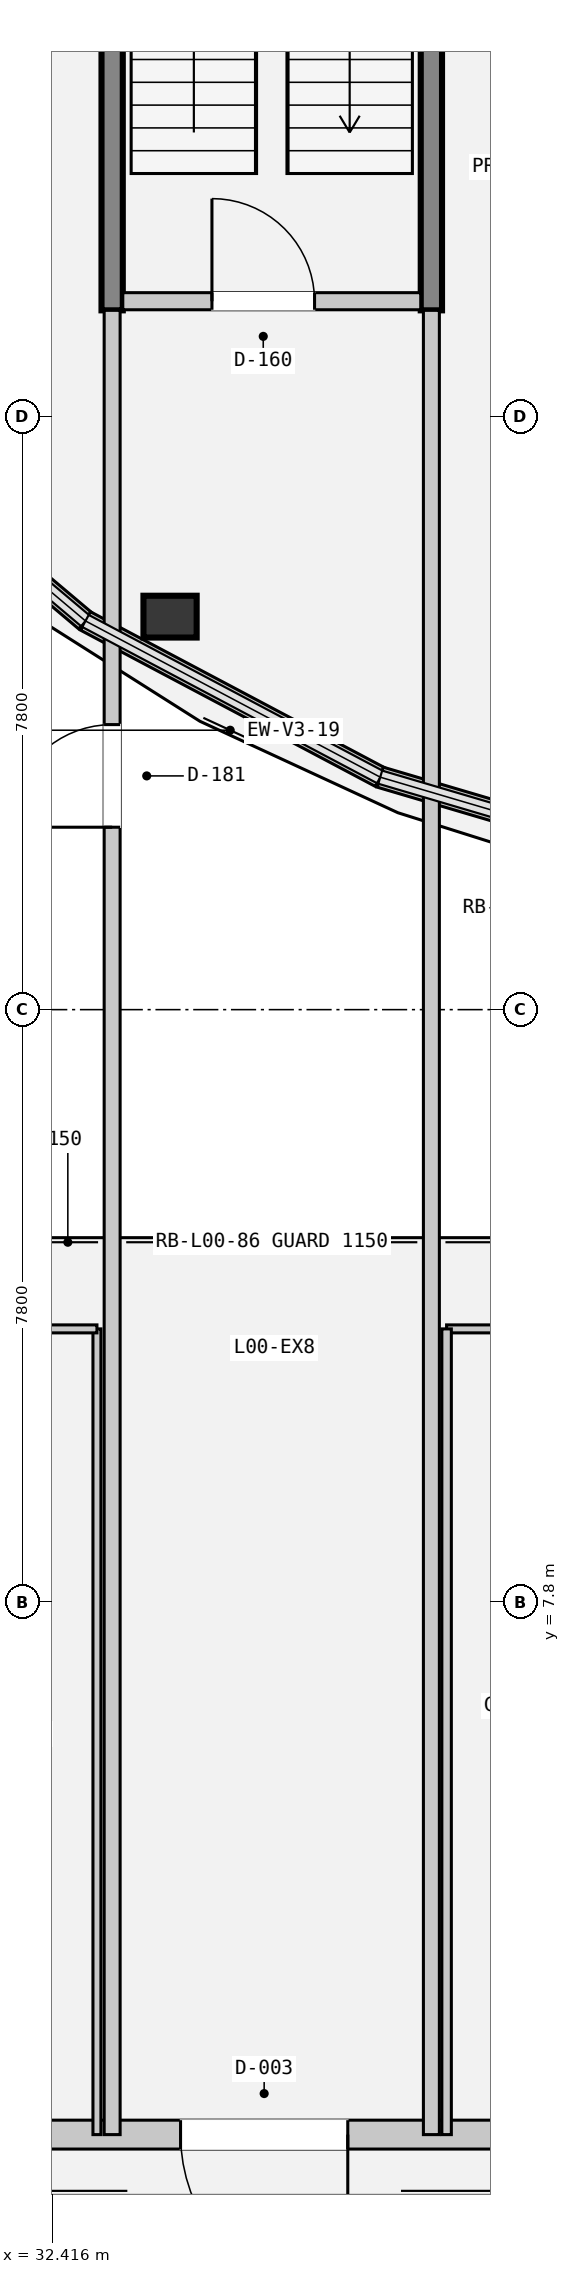
"""IFC4 building model, lengths in metres.
Left out: names, types, materials, properties, quantities, classifications, styles, units other than length and angle.
Written with IfcOpenShell. Run it as: python <this file> out.ifc"""

import sys

from ifc_helpers import new_model, si_unit, direction, frame, frame_2d, origin, origin_2d, place, context, subcontext, project, spatial, rectangle, extrude, element, fill, save


model = new_model("IFC4")
c1 = context("Model", 3, precision=1e-05, world=origin(), true_north=direction((0.0, 1.0)))
c2 = subcontext(c1, "Body", "Model", "MODEL_VIEW")
j1 = project(units=[si_unit("LENGTHUNIT", "METRE"), si_unit("PLANEANGLEUNIT", "RADIAN")], contexts=[c1])
p1 = place(None, origin())
s1 = spatial("IfcSite", under=j1, at=p1, CompositionType="ELEMENT")
p2 = place(p1, origin())
s2 = spatial("IfcBuilding", under=s1, at=p2, CompositionType="ELEMENT")
p3 = place(p2, origin())
s3 = spatial("IfcBuildingStorey", under=s2, at=p3, CompositionType="ELEMENT", Elevation=0.0)
p4 = place(p3, frame((33.962, 20.77, 0.0), z_axis=(0.0, 0.0, 1.0), x_axis=(1.0, 0.0, 0.0)))
e1 = element("IfcColumn", 1, at=p4, inside=s3, PredefinedType="COLUMN", context=c2, shape_type="SweptSolid", body=[
    extrude(rectangle(XDim=0.7, YDim=0.55, at=origin_2d()), origin(), (0.0, 0.0, 1.0), 5.4),
])
for number, where, z_axis, x_axis in (
    (2, (33.2, 24.8, 0.0), (0.0, 0.0, 1.0), (0.0, 1.0, 0.0)),
    (3, (37.4, 24.8, 0.0), (0.0, 0.0, 1.0), (0.0, 1.0, 0.0)),
):
    element("IfcWall", number, at=place(p3, frame(where, z_axis=z_axis, x_axis=x_axis)), inside=s3, PredefinedType="SHEAR", context=c2, shape_type="SweptSolid", body=[
        extrude(rectangle(XDim=8.4, YDim=0.28, at=frame_2d((4.2, 0.0))), origin(), (0.0, 0.0, 1.0), 5.4),
    ])
p5 = place(p3, frame((29.612, 23.445, 0.0), z_axis=(0.0, 0.0, 1.0), x_axis=(0.764366928563, -0.644781512234, 0.0)))
e4 = element("IfcWall", 4, at=p5, inside=s3, PredefinedType="SOLIDWALL", context=c2, shape_type="SweptSolid", body=[
    extrude(rectangle(XDim=4.236, YDim=0.275, at=frame_2d((2.118, 0.0))), origin(), (0.0, 0.0, 1.0), 1.02),
])
p6 = place(p3, frame((32.85, 20.713, 0.0), z_axis=(0.0, 0.0, 1.0), x_axis=(0.883560469247, -0.468317090425, 0.0)))
e5 = element("IfcWall", 5, at=p6, inside=s3, PredefinedType="SOLIDWALL", context=c2, shape_type="SweptSolid", body=[
    extrude(rectangle(XDim=4.388, YDim=0.275, at=frame_2d((2.194, 0.0))), origin(), (0.0, 0.0, 1.0), 1.02),
])
p7 = place(p3, frame((36.727, 18.658, 0.0), z_axis=(0.0, 0.0, 1.0), x_axis=(0.959101976786, -0.28306076755, 0.0)))
e6 = element("IfcWall", 6, at=p7, inside=s3, PredefinedType="SOLIDWALL", context=c2, shape_type="SweptSolid", body=[
    extrude(rectangle(XDim=4.507, YDim=0.275, at=frame_2d((2.253, 0.0))), origin(), (0.0, 0.0, 1.0), 1.02),
])
p8 = place(p3, frame((46.2, 0.8, 0.0), z_axis=(0.0, 0.0, 1.0), x_axis=(-1.0, 0.0, 0.0)))
e7 = element("IfcWall", 7, at=p8, inside=s3, PredefinedType="SOLIDWALL", context=c2, shape_type="SweptSolid", body=[
    extrude(rectangle(XDim=21.2, YDim=0.38, at=frame_2d((10.6, 0.0))), origin(), (0.0, 0.0, 1.0), 4.46),
])
p9 = place(p8, frame((9.9, 0.0, 0.0)))
e8 = element("IfcOpeningElement", 8, at=p9, cuts=e7, PredefinedType="OPENING", context=c2, shape_type="SweptSolid", body=[
    extrude(rectangle(XDim=2.2, YDim=2.6, at=frame_2d((1.1, 1.3))), frame((0.0, 0.2, 0.0), z_axis=(0.0, -1.0, 0.0), x_axis=(1.0, 0.0, 0.0)), (0.0, 0.0, 1.0), 0.4),
])
p10 = place(p8, frame((3.4, 0.0, 0.0)))
e9 = element("IfcOpeningElement", 9, at=p10, cuts=e7, PredefinedType="OPENING", context=c2, shape_type="SweptSolid", body=[
    extrude(rectangle(XDim=2.2, YDim=2.6, at=frame_2d((1.1, 1.3))), frame((0.0, 0.2, 0.0), z_axis=(0.0, -1.0, 0.0), x_axis=(1.0, 0.0, 0.0)), (0.0, 0.0, 1.0), 0.4),
])
p11 = place(p3, frame((33.34, 24.92, 0.0), z_axis=(0.0, 0.0, 1.0), x_axis=(1.0, 0.0, 0.0)))
e10 = element("IfcWall", 10, at=p11, inside=s3, PredefinedType="PARTITIONING", context=c2, shape_type="SweptSolid", body=[
    extrude(rectangle(XDim=3.92, YDim=0.225, at=frame_2d((1.96, 0.0))), origin(), (0.0, 0.0, 1.0), 4.11),
])
p12 = place(p11, frame((1.173, 0.0, 0.0)))
e11 = element("IfcOpeningElement", 11, at=p12, cuts=e10, PredefinedType="OPENING", context=c2, shape_type="SweptSolid", body=[
    extrude(rectangle(XDim=1.35, YDim=2.2, at=frame_2d((0.675, 1.1))), frame((0.0, 0.123, 0.0), z_axis=(0.0, -1.0, 0.0), x_axis=(1.0, 0.0, 0.0)), (0.0, 0.0, 1.0), 0.245),
])
p13 = place(p3, frame((33.0, 0.8, 0.0), z_axis=(0.0, 0.0, 1.0), x_axis=(0.0, 1.0, 0.0)))
e12 = element("IfcWall", 12, at=p13, inside=s3, PredefinedType="PARTITIONING", context=c2, shape_type="SweptSolid", body=[
    extrude(rectangle(XDim=10.6, YDim=0.105, at=frame_2d((5.3, 0.0))), origin(), (0.0, 0.0, 1.0), 3.45),
])
p14 = place(p3, frame((33.0, 11.4, 0.0), z_axis=(0.0, 0.0, 1.0), x_axis=(-1.0, 0.0, 0.0)))
e13 = element("IfcWall", 13, at=p14, inside=s3, PredefinedType="PARTITIONING", context=c2, shape_type="SweptSolid", body=[
    extrude(rectangle(XDim=7.8, YDim=0.105, at=frame_2d((3.9, 0.0))), origin(), (0.0, 0.0, 1.0), 3.45),
])
p15 = place(p14, frame((1.106, 0.0, 0.0)))
e14 = element("IfcOpeningElement", 14, at=p15, cuts=e13, PredefinedType="OPENING", context=c2, shape_type="SweptSolid", body=[
    extrude(rectangle(XDim=1.75, YDim=2.4, at=frame_2d((0.875, 1.2))), frame((0.0, 0.062, 0.0), z_axis=(0.0, -1.0, 0.0), x_axis=(1.0, 0.0, 0.0)), (0.0, 0.0, 1.0), 0.125),
])
p16 = place(p3, frame((46.0, 11.4, 0.0), z_axis=(0.0, 0.0, 1.0), x_axis=(-1.0, 0.0, 0.0)))
e15 = element("IfcWall", 15, at=p16, inside=s3, PredefinedType="PARTITIONING", context=c2, shape_type="SweptSolid", body=[
    extrude(rectangle(XDim=8.4, YDim=0.105, at=frame_2d((4.2, 0.0))), origin(), (0.0, 0.0, 1.0), 3.45),
])
p17 = place(p16, frame((0.911, 0.0, 0.0)))
e16 = element("IfcOpeningElement", 16, at=p17, cuts=e15, PredefinedType="OPENING", context=c2, shape_type="SweptSolid", body=[
    extrude(rectangle(XDim=1.85, YDim=2.4, at=frame_2d((0.925, 1.2))), frame((0.0, 0.062, 0.0), z_axis=(0.0, -1.0, 0.0), x_axis=(1.0, 0.0, 0.0)), (0.0, 0.0, 1.0), 0.125),
])
p18 = place(p3, frame((37.6, 11.4, 0.0), z_axis=(0.0, 0.0, 1.0), x_axis=(0.0, -1.0, 0.0)))
e17 = element("IfcWall", 17, at=p18, inside=s3, PredefinedType="PARTITIONING", context=c2, shape_type="SweptSolid", body=[
    extrude(rectangle(XDim=10.6, YDim=0.125, at=frame_2d((5.3, 0.0))), origin(), (0.0, 0.0, 1.0), 3.45),
])
p19 = place(p3, frame((37.4, 0.8, 0.0), z_axis=(0.0, 0.0, 1.0), x_axis=(0.0, 1.0, 0.0)))
e18 = element("IfcWall", 18, at=p19, inside=s3, PredefinedType="PARTITIONING", context=c2, shape_type="SweptSolid", body=[
    extrude(rectangle(XDim=24.0, YDim=0.21, at=frame_2d((12.0, 0.0))), origin(), (0.0, 0.0, 1.0), 3.45),
])
p20 = place(p3, frame((33.2, 0.8, 0.0), z_axis=(0.0, 0.0, 1.0), x_axis=(0.0, 1.0, 0.0)))
e19 = element("IfcWall", 19, at=p20, inside=s3, PredefinedType="PARTITIONING", context=c2, shape_type="SweptSolid", body=[
    extrude(rectangle(XDim=24.0, YDim=0.21, at=frame_2d((12.0, 0.0))), origin(), (0.0, 0.0, 1.0), 3.45),
])
p21 = place(p20, frame((17.2, 0.0, 0.0)))
e20 = element("IfcOpeningElement", 20, at=p21, cuts=e19, PredefinedType="OPENING", context=c2, shape_type="SweptSolid", body=[
    extrude(rectangle(XDim=1.35, YDim=2.2, at=frame_2d((0.675, 1.1))), frame((0.0, 0.115, 0.0), z_axis=(0.0, -1.0, 0.0), x_axis=(1.0, 0.0, 0.0)), (0.0, 0.0, 1.0), 0.23),
])
p22 = place(p9, origin())
e21 = element("IfcDoor", 21, at=p22, inside=s3, OperationType="DOUBLE_DOOR_SINGLE_SWING", PredefinedType="DOOR", context=c2, shape_type="SweptSolid", body=[
    extrude(rectangle(XDim=2.2, YDim=2.6, at=frame_2d((1.1, 1.3))), frame((0.0, 0.025, 0.0), z_axis=(0.0, -1.0, 0.0), x_axis=(1.0, 0.0, 0.0)), (0.0, 0.0, 1.0), 0.05),
])
fill(e8, e21)
p23 = place(p12, origin())
e22 = element("IfcDoor", 22, at=p23, inside=s3, OperationType="SINGLE_SWING_LEFT", PredefinedType="DOOR", context=c2, shape_type="SweptSolid", body=[
    extrude(rectangle(XDim=1.35, YDim=2.2, at=frame_2d((0.675, 1.1))), frame((0.0, 0.025, 0.0), z_axis=(0.0, -1.0, 0.0), x_axis=(1.0, 0.0, 0.0)), (0.0, 0.0, 1.0), 0.05),
])
fill(e11, e22)
p24 = place(p21, origin())
e23 = element("IfcDoor", 23, at=p24, inside=s3, OperationType="SINGLE_SWING_RIGHT", PredefinedType="DOOR", context=c2, shape_type="SweptSolid", body=[
    extrude(rectangle(XDim=1.35, YDim=2.2, at=frame_2d((0.675, 1.1))), frame((0.0, 0.025, 0.0), z_axis=(0.0, -1.0, 0.0), x_axis=(1.0, 0.0, 0.0)), (0.0, 0.0, 1.0), 0.05),
])
fill(e20, e23)
save(model, sys.argv[1])
